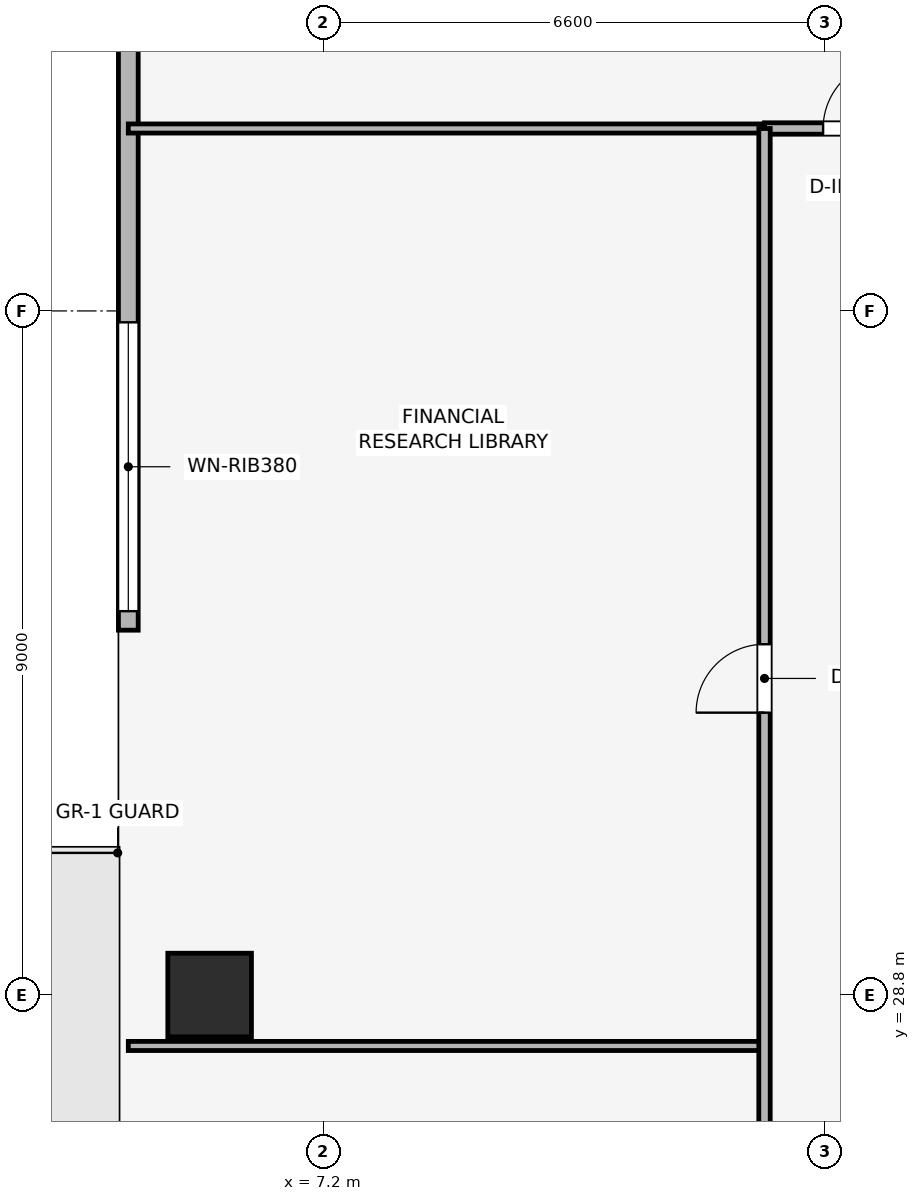
"""IFC4 building model, lengths in metres.
Left out: names, types, materials, properties, quantities, classifications, styles, units other than length and angle.
Written with IfcOpenShell. Run it as: python <this file> out.ifc"""

import sys

from ifc_helpers import new_model, si_unit, direction, frame, frame_2d, origin, origin_2d, place, context, subcontext, project, spatial, rectangle, extrude, element, fill, save


model = new_model("IFC4")
c1 = context("Model", 3, precision=1e-05, world=origin(), true_north=direction((0.0, 1.0)))
c2 = subcontext(c1, "Body", "Model", "MODEL_VIEW")
j1 = project(units=[si_unit("LENGTHUNIT", "METRE"), si_unit("PLANEANGLEUNIT", "RADIAN")], contexts=[c1])
p1 = place(None, origin())
s1 = spatial("IfcSite", under=j1, at=p1, CompositionType="ELEMENT")
p2 = place(p1, origin())
s2 = spatial("IfcBuilding", under=s1, at=p2, CompositionType="ELEMENT")
p3 = place(p2, frame((0.0, 0.0, 164.55)))
s3 = spatial("IfcBuildingStorey", under=s2, at=p3, CompositionType="ELEMENT", Elevation=164.55)
p4 = place(p3, frame((5.7, 28.8, 0.003), z_axis=(0.0, 0.0, 1.0), x_axis=(1.0, 0.0, 0.0)))
e1 = element("IfcColumn", 1, at=p4, inside=s3, PredefinedType="COLUMN", context=c2, shape_type="SweptSolid", body=[
    extrude(rectangle(XDim=1.1, YDim=1.1, at=origin_2d()), origin(), (0.0, 0.0, 1.0), 3.489),
])
p5 = place(p3, frame((4.63, 33.6, 0.0), z_axis=(0.0, 0.0, 1.0), x_axis=(0.0, 1.0, 0.0)))
e2 = element("IfcWall", 2, at=p5, inside=s3, PredefinedType="SOLIDWALL", context=c2, shape_type="SweptSolid", body=[
    extrude(rectangle(XDim=12.6, YDim=0.26, at=frame_2d((6.3, 0.0))), origin(), (0.0, 0.0, 1.0), 3.495),
])
p6 = place(p5, frame((0.25, 0.0, 0.9)))
e3 = element("IfcOpeningElement", 3, at=p6, cuts=e2, PredefinedType="OPENING", context=c2, shape_type="SweptSolid", body=[
    extrude(rectangle(XDim=3.8, YDim=1.9, at=frame_2d((1.9, 0.95))), frame((0.0, 0.14, 0.0), z_axis=(0.0, -1.0, 0.0), x_axis=(1.0, 0.0, 0.0)), (0.0, 0.0, 1.0), 0.28),
])
for number, where, z_axis, x_axis in (
    (4, (4.63, 28.13, 0.0), (0.0, 0.0, 1.0), (1.0, 0.0, 0.0)),
    (5, (4.63, 40.2, 0.0), (0.0, 0.0, 1.0), (1.0, 0.0, 0.0)),
):
    element("IfcWall", number, at=place(p3, frame(where, z_axis=z_axis, x_axis=x_axis)), inside=s3, PredefinedType="PARTITIONING", context=c2, shape_type="SweptSolid", body=[
        extrude(rectangle(XDim=8.37, YDim=0.12, at=frame_2d((4.185, 0.0))), origin(), (0.0, 0.0, 1.0), 2.98),
    ])
p7 = place(p3, frame((13.0, 40.2, 0.0), z_axis=(0.0, 0.0, 1.0), x_axis=(1.0, 0.0, 0.0)))
e6 = element("IfcWall", 6, at=p7, inside=s3, PredefinedType="PARTITIONING", context=c2, shape_type="SweptSolid", body=[
    extrude(rectangle(XDim=31.6, YDim=0.15, at=frame_2d((15.8, 0.0))), origin(), (0.0, 0.0, 1.0), 3.03),
])
p8 = place(p7, frame((0.771, 0.0, 0.0)))
e7 = element("IfcOpeningElement", 7, at=p8, cuts=e6, PredefinedType="OPENING", context=c2, shape_type="SweptSolid", body=[
    extrude(rectangle(XDim=0.9, YDim=2.1, at=frame_2d((0.45, 1.05))), frame((0.0, 0.085, 0.0), z_axis=(0.0, -1.0, 0.0), x_axis=(1.0, 0.0, 0.0)), (0.0, 0.0, 1.0), 0.17),
])
p9 = place(p7, frame((6.409, 0.0, 0.0)))
e8 = element("IfcOpeningElement", 8, at=p9, cuts=e6, PredefinedType="OPENING", context=c2, shape_type="SweptSolid", body=[
    extrude(rectangle(XDim=0.9, YDim=2.1, at=frame_2d((0.45, 1.05))), frame((0.0, 0.085, 0.0), z_axis=(0.0, -1.0, 0.0), x_axis=(1.0, 0.0, 0.0)), (0.0, 0.0, 1.0), 0.17),
])
p10 = place(p7, frame((15.239, 0.0, 0.0)))
e9 = element("IfcOpeningElement", 9, at=p10, cuts=e6, PredefinedType="OPENING", context=c2, shape_type="SweptSolid", body=[
    extrude(rectangle(XDim=0.9, YDim=2.1, at=frame_2d((0.45, 1.05))), frame((0.0, 0.085, 0.0), z_axis=(0.0, -1.0, 0.0), x_axis=(1.0, 0.0, 0.0)), (0.0, 0.0, 1.0), 0.17),
])
p11 = place(p7, frame((25.402, 0.0, 0.0)))
e10 = element("IfcOpeningElement", 10, at=p11, cuts=e6, PredefinedType="OPENING", context=c2, shape_type="SweptSolid", body=[
    extrude(rectangle(XDim=0.9, YDim=2.1, at=frame_2d((0.45, 1.05))), frame((0.0, 0.085, 0.0), z_axis=(0.0, -1.0, 0.0), x_axis=(1.0, 0.0, 0.0)), (0.0, 0.0, 1.0), 0.17),
])
p12 = place(p3, frame((13.0, 17.4, 0.0), z_axis=(0.0, 0.0, 1.0), x_axis=(0.0, 1.0, 0.0)))
e11 = element("IfcWall", 11, at=p12, inside=s3, PredefinedType="PARTITIONING", context=c2, shape_type="SweptSolid", body=[
    extrude(rectangle(XDim=22.8, YDim=0.15, at=frame_2d((11.4, 0.0))), origin(), (0.0, 0.0, 1.0), 3.03),
])
p13 = place(p12, frame((6.115, 0.0, 0.0)))
e12 = element("IfcOpeningElement", 12, at=p13, cuts=e11, PredefinedType="OPENING", context=c2, shape_type="SweptSolid", body=[
    extrude(rectangle(XDim=0.9, YDim=2.1, at=frame_2d((0.45, 1.05))), frame((0.0, 0.085, 0.0), z_axis=(0.0, -1.0, 0.0), x_axis=(1.0, 0.0, 0.0)), (0.0, 0.0, 1.0), 0.17),
])
p14 = place(p12, frame((15.115, 0.0, 0.0)))
e13 = element("IfcOpeningElement", 13, at=p14, cuts=e11, PredefinedType="OPENING", context=c2, shape_type="SweptSolid", body=[
    extrude(rectangle(XDim=0.9, YDim=2.1, at=frame_2d((0.45, 1.05))), frame((0.0, 0.085, 0.0), z_axis=(0.0, -1.0, 0.0), x_axis=(1.0, 0.0, 0.0)), (0.0, 0.0, 1.0), 0.17),
])
p15 = place(p6, origin())
e14 = element("IfcWindow", 14, at=p15, inside=s3, PartitioningType="SINGLE_PANEL", PredefinedType="WINDOW", context=c2, shape_type="SweptSolid", body=[
    extrude(rectangle(XDim=3.8, YDim=1.9, at=frame_2d((1.9, 0.95))), frame((0.0, 0.03, 0.0), z_axis=(0.0, -1.0, 0.0), x_axis=(1.0, 0.0, 0.0)), (0.0, 0.0, 1.0), 0.06),
])
fill(e3, e14)
p16 = place(p8, origin())
e15 = element("IfcDoor", 15, at=p16, inside=s3, OperationType="SINGLE_SWING_RIGHT", PredefinedType="DOOR", context=c2, shape_type="SweptSolid", body=[
    extrude(rectangle(XDim=0.9, YDim=2.1, at=frame_2d((0.45, 1.05))), frame((0.0, 0.025, 0.0), z_axis=(0.0, -1.0, 0.0), x_axis=(1.0, 0.0, 0.0)), (0.0, 0.0, 1.0), 0.05),
])
fill(e7, e15)
p17 = place(p14, origin())
e16 = element("IfcDoor", 16, at=p17, inside=s3, OperationType="SINGLE_SWING_LEFT", PredefinedType="DOOR", context=c2, shape_type="SweptSolid", body=[
    extrude(rectangle(XDim=0.9, YDim=2.1, at=frame_2d((0.45, 1.05))), frame((0.0, 0.025, 0.0), z_axis=(0.0, -1.0, 0.0), x_axis=(1.0, 0.0, 0.0)), (0.0, 0.0, 1.0), 0.05),
])
fill(e13, e16)
save(model, sys.argv[1])
